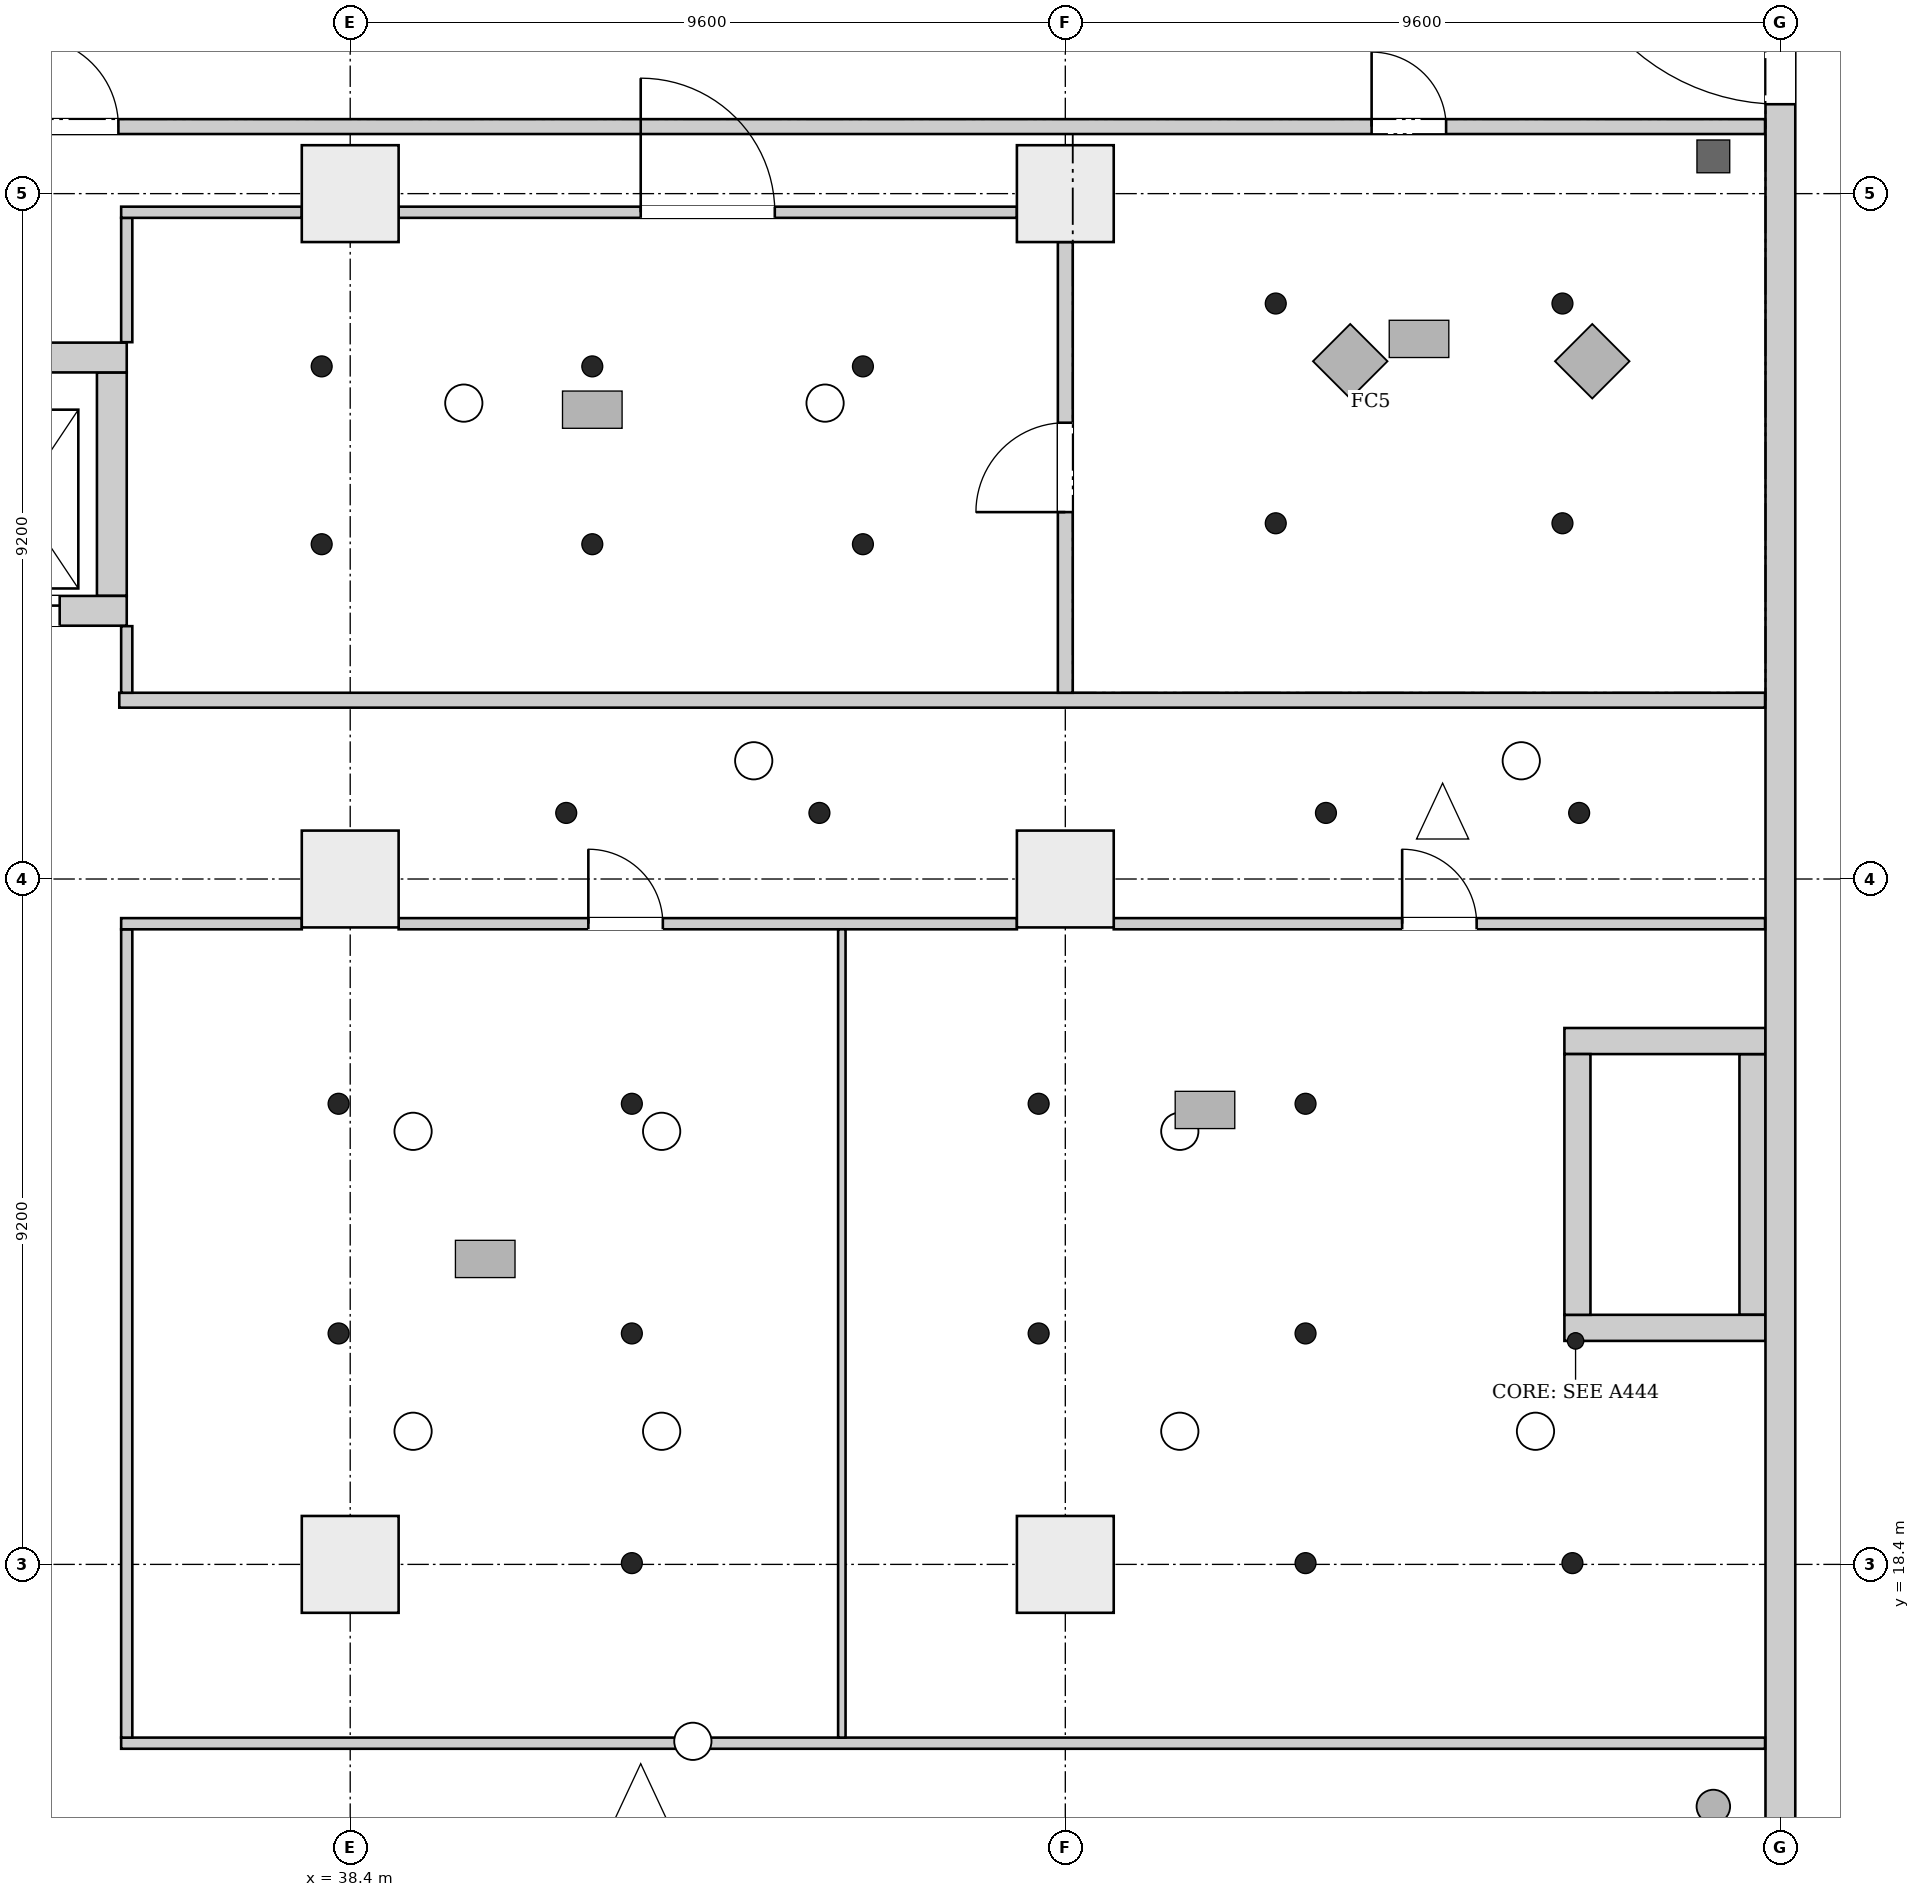
"""IFC4 building model, lengths in metres.
Left out: names, types, materials, properties, quantities, classifications, styles, units other than length and angle.
Written with IfcOpenShell. Run it as: python <this file> out.ifc"""

import sys

from ifc_helpers import new_model, si_unit, direction, frame, frame_2d, origin, origin_2d, place, context, subcontext, project, spatial, rectangle, extrude, element, fill, save


model = new_model("IFC4")
c1 = context("Model", 3, precision=1e-05, world=origin(), true_north=direction((0.0, 1.0)))
c2 = subcontext(c1, "Body", "Model", "MODEL_VIEW")
j1 = project(units=[si_unit("LENGTHUNIT", "METRE"), si_unit("PLANEANGLEUNIT", "RADIAN")], contexts=[c1])
p1 = place(None, origin())
s1 = spatial("IfcSite", under=j1, at=p1, CompositionType="ELEMENT")
p2 = place(p1, origin())
s2 = spatial("IfcBuilding", under=s1, at=p2, CompositionType="ELEMENT")
p3 = place(p2, origin())
s3 = spatial("IfcBuildingStorey", under=s2, at=p3, CompositionType="ELEMENT", Elevation=0.0)
p4 = place(p3, frame((57.6, -0.2, 0.0), z_axis=(0.0, 0.0, 1.0), x_axis=(0.0, 1.0, 0.0)))
e1 = element("IfcWall", 1, at=p4, inside=s3, PredefinedType="SHEAR", context=c2, shape_type="SweptSolid", body=[
    extrude(rectangle(XDim=46.88, YDim=0.4, at=frame_2d((23.44, 0.0))), origin(), (0.0, 0.0, 1.0), 6.5),
])
p5 = place(p4, frame((11.65, 0.0, 0.0)))
e2 = element("IfcOpeningElement", 2, at=p5, cuts=e1, PredefinedType="OPENING", context=c2, shape_type="SweptSolid", body=[
    extrude(rectangle(XDim=3.0, YDim=2.4, at=frame_2d((1.5, 1.2))), frame((0.0, 0.21, 0.0), z_axis=(0.0, -1.0, 0.0), x_axis=(1.0, 0.0, 0.0)), (0.0, 0.0, 1.0), 0.42),
])
p6 = place(p4, frame((38.2, 0.0, 0.0)))
e3 = element("IfcOpeningElement", 3, at=p6, cuts=e1, PredefinedType="OPENING", context=c2, shape_type="SweptSolid", body=[
    extrude(rectangle(XDim=3.0, YDim=2.4, at=frame_2d((1.5, 1.2))), frame((0.0, 0.21, 0.0), z_axis=(0.0, -1.0, 0.0), x_axis=(1.0, 0.0, 0.0)), (0.0, 0.0, 1.0), 0.42),
])
for number, where, z_axis, x_axis in (
    (4, (54.7, 21.575, 0.0), (0.0, 0.0, 1.0), (1.0, 0.0, 0.0)),
    (5, (54.7, 25.425, 0.0), (0.0, 0.0, 1.0), (1.0, 0.0, 0.0)),
):
    element("IfcWall", number, at=place(p3, frame(where, z_axis=z_axis, x_axis=x_axis)), inside=s3, PredefinedType="SHEAR", context=c2, shape_type="SweptSolid", body=[
        extrude(rectangle(XDim=2.7, YDim=0.35, at=frame_2d((1.35, 0.0))), origin(), (0.0, 0.0, 1.0), 6.5),
    ])
for number, where, z_axis, x_axis in (
    (6, (54.875, 21.75, 0.0), (0.0, 0.0, 1.0), (0.0, 1.0, 0.0)),
    (7, (57.225, 21.75, 0.0), (0.0, 0.0, 1.0), (0.0, 1.0, 0.0)),
):
    element("IfcWall", number, at=place(p3, frame(where, z_axis=z_axis, x_axis=x_axis)), inside=s3, PredefinedType="SHEAR", context=c2, shape_type="SweptSolid", body=[
        extrude(rectangle(XDim=3.5, YDim=0.35, at=frame_2d((1.75, 0.0))), origin(), (0.0, 0.0, 1.0), 6.5),
    ])
p7 = place(p3, frame((32.5, 31.2, 0.0), z_axis=(0.0, 0.0, 1.0), x_axis=(1.0, 0.0, 0.0)))
e8 = element("IfcWall", 8, at=p7, inside=s3, PredefinedType="SHEAR", context=c2, shape_type="SweptSolid", body=[
    extrude(rectangle(XDim=2.9, YDim=0.4, at=frame_2d((1.45, 0.0))), origin(), (0.0, 0.0, 1.0), 6.5),
])
p8 = place(p7, frame((0.9, 0.0, 0.0)))
e9 = element("IfcOpeningElement", 9, at=p8, cuts=e8, PredefinedType="OPENING", context=c2, shape_type="SweptSolid", body=[
    extrude(rectangle(XDim=1.1, YDim=2.1, at=frame_2d((0.55, 1.05))), frame((0.0, 0.21, 0.0), z_axis=(0.0, -1.0, 0.0), x_axis=(1.0, 0.0, 0.0)), (0.0, 0.0, 1.0), 0.42),
])
p9 = place(p3, frame((32.5, 34.6, 0.0), z_axis=(0.0, 0.0, 1.0), x_axis=(1.0, 0.0, 0.0)))
e10 = element("IfcWall", 10, at=p9, inside=s3, PredefinedType="SHEAR", context=c2, shape_type="SweptSolid", body=[
    extrude(rectangle(XDim=2.9, YDim=0.4, at=frame_2d((1.45, 0.0))), origin(), (0.0, 0.0, 1.0), 6.5),
])
p10 = place(p3, frame((35.2, 31.4, 0.0), z_axis=(0.0, 0.0, 1.0), x_axis=(0.0, 1.0, 0.0)))
e11 = element("IfcWall", 11, at=p10, inside=s3, PredefinedType="SHEAR", context=c2, shape_type="SweptSolid", body=[
    extrude(rectangle(XDim=3.0, YDim=0.4, at=frame_2d((1.5, 0.0))), origin(), (0.0, 0.0, 1.0), 6.5),
])
for number, where, z_axis, x_axis in (
    (12, (38.4, 18.4, 0.0), (0.0, 0.0, 1.0), (1.0, 0.0, 0.0)),
    (13, (48.0, 18.4, 0.0), (0.0, 0.0, 1.0), (1.0, 0.0, 0.0)),
    (14, (38.4, 27.6, 0.0), (0.0, 0.0, 1.0), (1.0, 0.0, 0.0)),
    (15, (48.0, 27.6, 0.0), (0.0, 0.0, 1.0), (1.0, 0.0, 0.0)),
    (16, (38.4, 36.8, 0.0), (0.0, 0.0, 1.0), (1.0, 0.0, 0.0)),
    (17, (48.0, 36.8, 0.0), (0.0, 0.0, 1.0), (1.0, 0.0, 0.0)),
):
    element("IfcColumn", number, at=place(p3, frame(where, z_axis=z_axis, x_axis=x_axis)), inside=s3, PredefinedType="COLUMN", context=c2, shape_type="SweptSolid", body=[
        extrude(rectangle(XDim=1.3, YDim=1.3, at=origin_2d()), origin(), (0.0, 0.0, 1.0), 6.5),
    ])
p11 = place(p3, frame((28.006, 37.7, 0.0), z_axis=(0.0, 0.0, 1.0), x_axis=(1.0, 0.0, 0.0)))
e18 = element("IfcWall", 18, at=p11, inside=s3, PredefinedType="PARTITIONING", context=c2, shape_type="SweptSolid", body=[
    extrude(rectangle(XDim=29.388, YDim=0.2, at=frame_2d((14.694, 0.0))), origin(), (0.0, 0.0, 1.0), 6.15),
])
p12 = place(p11, frame((24.106, 0.0, 0.0)))
e19 = element("IfcOpeningElement", 19, at=p12, cuts=e18, PredefinedType="OPENING", context=c2, shape_type="SweptSolid", body=[
    extrude(rectangle(XDim=1.0, YDim=2.1, at=frame_2d((0.5, 1.05))), frame((0.0, 0.11, 0.0), z_axis=(0.0, -1.0, 0.0), x_axis=(1.0, 0.0, 0.0)), (0.0, 0.0, 1.0), 0.22),
])
p13 = place(p11, frame((6.082, 0.0, 0.0)))
e20 = element("IfcOpeningElement", 20, at=p13, cuts=e18, PredefinedType="OPENING", context=c2, shape_type="SweptSolid", body=[
    extrude(rectangle(XDim=1.2, YDim=2.1, at=frame_2d((0.6, 1.05))), frame((0.0, 0.11, 0.0), z_axis=(0.0, -1.0, 0.0), x_axis=(1.0, 0.0, 0.0)), (0.0, 0.0, 1.0), 0.22),
])
p14 = place(p3, frame((35.3, 30.0, 0.0), z_axis=(0.0, 0.0, 1.0), x_axis=(1.0, 0.0, 0.0)))
e21 = element("IfcWall", 21, at=p14, inside=s3, PredefinedType="PARTITIONING", context=c2, shape_type="SweptSolid", body=[
    extrude(rectangle(XDim=22.094, YDim=0.2, at=frame_2d((11.047, 0.0))), origin(), (0.0, 0.0, 1.0), 6.15),
])
p15 = place(p3, frame((35.325, 16.0, 0.0), z_axis=(0.0, 0.0, 1.0), x_axis=(1.0, 0.0, 0.0)))
e22 = element("IfcWall", 22, at=p15, inside=s3, PredefinedType="PARTITIONING", context=c2, shape_type="SweptSolid", body=[
    extrude(rectangle(XDim=22.069, YDim=0.15, at=frame_2d((11.035, 0.0))), origin(), (0.0, 0.0, 1.0), 6.15),
])
p16 = place(p3, frame((35.4, 16.075, 0.0), z_axis=(0.0, 0.0, 1.0), x_axis=(0.0, 1.0, 0.0)))
e23 = element("IfcWall", 23, at=p16, inside=s3, PredefinedType="PARTITIONING", context=c2, shape_type="SweptSolid", body=[
    extrude(rectangle(XDim=10.85, YDim=0.15, at=frame_2d((5.425, 0.0))), origin(), (0.0, 0.0, 1.0), 6.15),
])
p17 = place(p3, frame((35.325, 27.0, 0.0), z_axis=(0.0, 0.0, 1.0), x_axis=(1.0, 0.0, 0.0)))
e24 = element("IfcWall", 24, at=p17, inside=s3, PredefinedType="PARTITIONING", context=c2, shape_type="SweptSolid", body=[
    extrude(rectangle(XDim=2.425, YDim=0.15, at=frame_2d((1.212, 0.0))), origin(), (0.0, 0.0, 1.0), 6.15),
])
p18 = place(p3, frame((35.4, 30.1, 0.0), z_axis=(0.0, 0.0, 1.0), x_axis=(0.0, 1.0, 0.0)))
e25 = element("IfcWall", 25, at=p18, inside=s3, PredefinedType="PARTITIONING", context=c2, shape_type="SweptSolid", body=[
    extrude(rectangle(XDim=0.894, YDim=0.15, at=frame_2d((0.447, 0.0))), origin(), (0.0, 0.0, 1.0), 6.15),
])
p19 = place(p3, frame((35.4, 34.806, 0.0), z_axis=(0.0, 0.0, 1.0), x_axis=(0.0, 1.0, 0.0)))
e26 = element("IfcWall", 26, at=p19, inside=s3, PredefinedType="PARTITIONING", context=c2, shape_type="SweptSolid", body=[
    extrude(rectangle(XDim=1.669, YDim=0.15, at=frame_2d((0.834, 0.0))), origin(), (0.0, 0.0, 1.0), 6.15),
])
p20 = place(p3, frame((35.325, 36.55, 0.0), z_axis=(0.0, 0.0, 1.0), x_axis=(1.0, 0.0, 0.0)))
e27 = element("IfcWall", 27, at=p20, inside=s3, PredefinedType="PARTITIONING", context=c2, shape_type="SweptSolid", body=[
    extrude(rectangle(XDim=2.425, YDim=0.15, at=frame_2d((1.212, 0.0))), origin(), (0.0, 0.0, 1.0), 5.75),
])
p21 = place(p3, frame((39.05, 27.0, 0.0), z_axis=(0.0, 0.0, 1.0), x_axis=(1.0, 0.0, 0.0)))
e28 = element("IfcWall", 28, at=p21, inside=s3, PredefinedType="PARTITIONING", context=c2, shape_type="SweptSolid", body=[
    extrude(rectangle(XDim=8.3, YDim=0.15, at=frame_2d((4.15, 0.0))), origin(), (0.0, 0.0, 1.0), 6.15),
])
p22 = place(p21, frame((2.547, 0.0, 0.0)))
e29 = element("IfcOpeningElement", 29, at=p22, cuts=e28, PredefinedType="OPENING", context=c2, shape_type="SweptSolid", body=[
    extrude(rectangle(XDim=1.0, YDim=2.1, at=frame_2d((0.5, 1.05))), frame((0.0, 0.085, 0.0), z_axis=(0.0, -1.0, 0.0), x_axis=(1.0, 0.0, 0.0)), (0.0, 0.0, 1.0), 0.17),
])
p23 = place(p3, frame((39.05, 36.55, 0.0), z_axis=(0.0, 0.0, 1.0), x_axis=(1.0, 0.0, 0.0)))
e30 = element("IfcWall", 30, at=p23, inside=s3, PredefinedType="PARTITIONING", context=c2, shape_type="SweptSolid", body=[
    extrude(rectangle(XDim=8.3, YDim=0.15, at=frame_2d((4.15, 0.0))), origin(), (0.0, 0.0, 1.0), 5.75),
])
p24 = place(p23, frame((3.25, 0.0, 0.0)))
e31 = element("IfcOpeningElement", 31, at=p24, cuts=e30, PredefinedType="OPENING", context=c2, shape_type="SweptSolid", body=[
    extrude(rectangle(XDim=1.8, YDim=2.1, at=frame_2d((0.9, 1.05))), frame((0.0, 0.085, 0.0), z_axis=(0.0, -1.0, 0.0), x_axis=(1.0, 0.0, 0.0)), (0.0, 0.0, 1.0), 0.17),
])
p25 = place(p3, frame((45.0, 16.075, 0.0), z_axis=(0.0, 0.0, 1.0), x_axis=(0.0, 1.0, 0.0)))
e32 = element("IfcWall", 32, at=p25, inside=s3, PredefinedType="PARTITIONING", context=c2, shape_type="SweptSolid", body=[
    extrude(rectangle(XDim=10.85, YDim=0.1, at=frame_2d((5.425, 0.0))), origin(), (0.0, 0.0, 1.0), 6.15),
])
p26 = place(p3, frame((48.0, 30.1, 0.0), z_axis=(0.0, 0.0, 1.0), x_axis=(0.0, 1.0, 0.0)))
e33 = element("IfcWall", 33, at=p26, inside=s3, PredefinedType="PARTITIONING", context=c2, shape_type="SweptSolid", body=[
    extrude(rectangle(XDim=6.05, YDim=0.2, at=frame_2d((3.025, 0.0))), origin(), (0.0, 0.0, 1.0), 5.75),
])
p27 = place(p26, frame((2.425, 0.0, 0.0)))
e34 = element("IfcOpeningElement", 34, at=p27, cuts=e33, PredefinedType="OPENING", context=c2, shape_type="SweptSolid", body=[
    extrude(rectangle(XDim=1.2, YDim=2.1, at=frame_2d((0.6, 1.05))), frame((0.0, 0.11, 0.0), z_axis=(0.0, -1.0, 0.0), x_axis=(1.0, 0.0, 0.0)), (0.0, 0.0, 1.0), 0.22),
])
p28 = place(p3, frame((48.65, 27.0, 0.0), z_axis=(0.0, 0.0, 1.0), x_axis=(1.0, 0.0, 0.0)))
e35 = element("IfcWall", 35, at=p28, inside=s3, PredefinedType="PARTITIONING", context=c2, shape_type="SweptSolid", body=[
    extrude(rectangle(XDim=8.744, YDim=0.15, at=frame_2d((4.372, 0.0))), origin(), (0.0, 0.0, 1.0), 6.15),
])
p29 = place(p28, frame((3.872, 0.0, 0.0)))
e36 = element("IfcOpeningElement", 36, at=p29, cuts=e35, PredefinedType="OPENING", context=c2, shape_type="SweptSolid", body=[
    extrude(rectangle(XDim=1.0, YDim=2.1, at=frame_2d((0.5, 1.05))), frame((0.0, 0.085, 0.0), z_axis=(0.0, -1.0, 0.0), x_axis=(1.0, 0.0, 0.0)), (0.0, 0.0, 1.0), 0.17),
])
p30 = place(p6, frame((3.0, 0.0, 0.0), z_axis=(0.0, 0.0, 1.0), x_axis=(-1.0, 0.0, 0.0)))
e37 = element("IfcDoor", 37, at=p30, inside=s3, OperationType="DOUBLE_DOOR_SINGLE_SWING", PredefinedType="DOOR", context=c2, shape_type="SweptSolid", body=[
    extrude(rectangle(XDim=3.0, YDim=2.4, at=frame_2d((1.5, 1.2))), frame((0.0, 0.025, 0.0), z_axis=(0.0, -1.0, 0.0), x_axis=(1.0, 0.0, 0.0)), (0.0, 0.0, 1.0), 0.05),
])
fill(e3, e37)
p31 = place(p8, origin())
e38 = element("IfcDoor", 38, at=p31, inside=s3, OperationType="DOUBLE_DOOR_SLIDING", PredefinedType="DOOR", context=c2, shape_type="SweptSolid", body=[
    extrude(rectangle(XDim=1.1, YDim=2.1, at=frame_2d((0.55, 1.05))), frame((0.0, 0.025, 0.0), z_axis=(0.0, -1.0, 0.0), x_axis=(1.0, 0.0, 0.0)), (0.0, 0.0, 1.0), 0.05),
])
fill(e9, e38)
p32 = place(p22, origin())
e39 = element("IfcDoor", 39, at=p32, inside=s3, OperationType="SINGLE_SWING_LEFT", PredefinedType="DOOR", context=c2, shape_type="SweptSolid", body=[
    extrude(rectangle(XDim=1.0, YDim=2.1, at=frame_2d((0.5, 1.05))), frame((0.0, 0.025, 0.0), z_axis=(0.0, -1.0, 0.0), x_axis=(1.0, 0.0, 0.0)), (0.0, 0.0, 1.0), 0.05),
])
fill(e29, e39)
p33 = place(p29, origin())
e40 = element("IfcDoor", 40, at=p33, inside=s3, OperationType="SINGLE_SWING_LEFT", PredefinedType="DOOR", context=c2, shape_type="SweptSolid", body=[
    extrude(rectangle(XDim=1.0, YDim=2.1, at=frame_2d((0.5, 1.05))), frame((0.0, 0.025, 0.0), z_axis=(0.0, -1.0, 0.0), x_axis=(1.0, 0.0, 0.0)), (0.0, 0.0, 1.0), 0.05),
])
fill(e36, e40)
p34 = place(p24, origin())
e41 = element("IfcDoor", 41, at=p34, inside=s3, OperationType="DOUBLE_DOOR_SINGLE_SWING", PredefinedType="DOOR", context=c2, shape_type="SweptSolid", body=[
    extrude(rectangle(XDim=1.8, YDim=2.1, at=frame_2d((0.9, 1.05))), frame((0.0, 0.025, 0.0), z_axis=(0.0, -1.0, 0.0), x_axis=(1.0, 0.0, 0.0)), (0.0, 0.0, 1.0), 0.05),
])
fill(e31, e41)
p35 = place(p27, origin())
e42 = element("IfcDoor", 42, at=p35, inside=s3, OperationType="SINGLE_SWING_RIGHT", PredefinedType="DOOR", context=c2, shape_type="SweptSolid", body=[
    extrude(rectangle(XDim=1.2, YDim=2.1, at=frame_2d((0.6, 1.05))), frame((0.0, 0.025, 0.0), z_axis=(0.0, -1.0, 0.0), x_axis=(1.0, 0.0, 0.0)), (0.0, 0.0, 1.0), 0.05),
])
fill(e34, e42)
p36 = place(p12, origin())
e43 = element("IfcDoor", 43, at=p36, inside=s3, OperationType="SINGLE_SWING_RIGHT", PredefinedType="DOOR", context=c2, shape_type="SweptSolid", body=[
    extrude(rectangle(XDim=1.0, YDim=2.1, at=frame_2d((0.5, 1.05))), frame((0.0, 0.025, 0.0), z_axis=(0.0, -1.0, 0.0), x_axis=(1.0, 0.0, 0.0)), (0.0, 0.0, 1.0), 0.05),
])
fill(e19, e43)
p37 = place(p13, origin())
e44 = element("IfcDoor", 44, at=p37, inside=s3, OperationType="SINGLE_SWING_LEFT", PredefinedType="DOOR", context=c2, shape_type="SweptSolid", body=[
    extrude(rectangle(XDim=1.2, YDim=2.1, at=frame_2d((0.6, 1.05))), frame((0.0, 0.025, 0.0), z_axis=(0.0, -1.0, 0.0), x_axis=(1.0, 0.0, 0.0)), (0.0, 0.0, 1.0), 0.05),
])
fill(e20, e44)
save(model, sys.argv[1])
